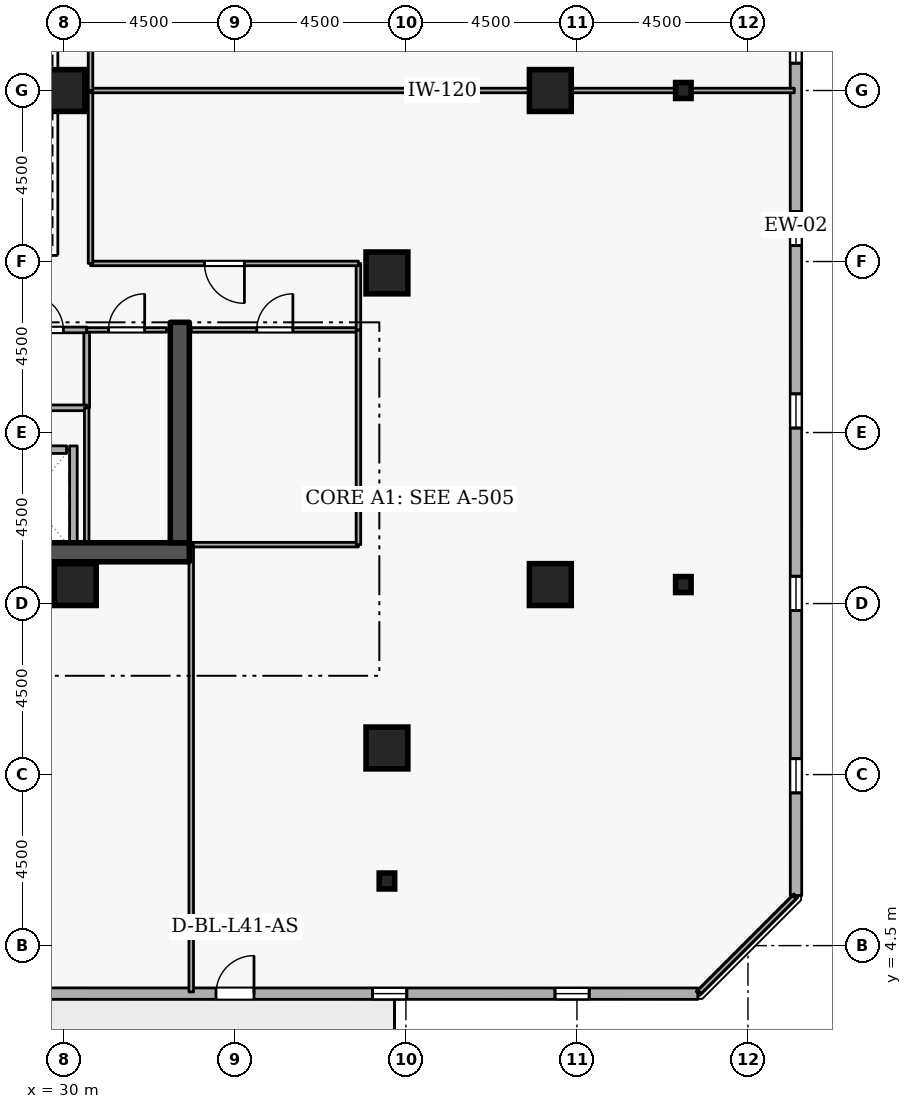
"""IFC4 building model, lengths in metres.
Left out: names, types, materials, properties, quantities, classifications, styles, units other than length and angle.
Written with IfcOpenShell. Run it as: python <this file> out.ifc"""

import sys

from ifc_helpers import new_model, si_unit, direction, frame, frame_2d, origin, origin_2d, place, context, subcontext, project, spatial, rectangle, i_section, extrude, element, fill, save


model = new_model("IFC4")
c1 = context("Model", 3, precision=1e-05, world=origin(), true_north=direction((0.0, 1.0)))
c2 = subcontext(c1, "Body", "Model", "MODEL_VIEW")
j1 = project(units=[si_unit("LENGTHUNIT", "METRE"), si_unit("PLANEANGLEUNIT", "RADIAN")], contexts=[c1])
p1 = place(None, origin())
s1 = spatial("IfcSite", under=j1, at=p1, CompositionType="ELEMENT")
p2 = place(p1, origin())
s2 = spatial("IfcBuilding", under=s1, at=p2, CompositionType="ELEMENT")
p3 = place(p2, frame((0.0, 0.0, 156.3)))
s3 = spatial("IfcBuildingStorey", under=s2, at=p3, CompositionType="ELEMENT", Elevation=156.3)
p4 = place(p3, frame((17.7, 14.85, 0.0), z_axis=(0.0, 0.0, 1.0), x_axis=(1.0, 0.0, 0.0)))
e1 = element("IfcWall", 1, at=p4, inside=s3, PredefinedType="SHEAR", context=c2, shape_type="SweptSolid", body=[
    extrude(rectangle(XDim=15.6, YDim=0.5, at=frame_2d((7.8, 0.0))), origin(), (0.0, 0.0, 1.0), 3.6),
])
p5 = place(p3, frame((33.05, 15.1, 0.0), z_axis=(0.0, 0.0, 1.0), x_axis=(0.0, 1.0, 0.0)))
e2 = element("IfcWall", 2, at=p5, inside=s3, PredefinedType="SHEAR", context=c2, shape_type="SweptSolid", body=[
    extrude(rectangle(XDim=5.8, YDim=0.5, at=frame_2d((2.9, 0.0))), origin(), (0.0, 0.0, 1.0), 3.6),
])
for number, where, z_axis, x_axis in (
    (3, (38.5, 9.7, 0.0), (0.0, 0.0, 1.0), (1.0, 0.0, 0.0)),
    (4, (42.8, 14.0, 0.0), (0.0, 0.0, 1.0), (1.0, 0.0, 0.0)),
    (5, (42.8, 27.0, 0.0), (0.0, 0.0, 1.0), (1.0, 0.0, 0.0)),
    (6, (38.5, 22.2, 0.0), (0.0, 0.0, 1.0), (1.0, 0.0, 0.0)),
    (7, (30.3, 14.0, 0.0), (0.0, 0.0, 1.0), (1.0, 0.0, 0.0)),
    (8, (30.0, 27.0, 0.0), (0.0, 0.0, 1.0), (1.0, 0.0, 0.0)),
):
    element("IfcColumn", number, at=place(p3, frame(where, z_axis=z_axis, x_axis=x_axis)), inside=s3, PredefinedType="COLUMN", context=c2, shape_type="SweptSolid", body=[
        extrude(rectangle(XDim=1.1, YDim=1.1, at=origin_2d()), origin(), (0.0, 0.0, 1.0), 3.6),
    ])
for number, where, z_axis, x_axis in (
    (9, (38.5, 6.2, 0.0), (0.0, 0.0, 1.0), (1.0, 0.0, 0.0)),
    (10, (46.3, 14.0, 0.0), (0.0, 0.0, 1.0), (1.0, 0.0, 0.0)),
    (11, (46.3, 27.0, 0.0), (0.0, 0.0, 1.0), (1.0, 0.0, 0.0)),
):
    element("IfcColumn", number, at=place(p3, frame(where, z_axis=z_axis, x_axis=x_axis)), inside=s3, PredefinedType="COLUMN", context=c2, shape_type="SweptSolid", body=[
        extrude(i_section(OverallWidth=0.407, OverallDepth=0.419, WebThickness=0.031, FlangeThickness=0.049, FilletRadius=0.015, at=origin_2d()), origin(), (0.0, 0.0, 1.0), 3.6),
    ])
p6 = place(p3, frame((11.422, 3.239, 0.0), z_axis=(0.0, 0.0, 1.0), x_axis=(0.999999994606, -0.000103863011, 0.0)))
e12 = element("IfcWall", 12, at=p6, inside=s3, PredefinedType="STANDARD", context=c2, shape_type="SweptSolid", body=[
    extrude(rectangle(XDim=35.259, YDim=0.3, at=frame_2d((17.629, 0.0))), origin(), (0.0, 0.0, 1.0), 2.7),
])
p7 = place(p6, frame((22.58, 0.0, 0.0)))
e13 = element("IfcOpeningElement", 13, at=p7, cuts=e12, PredefinedType="OPENING", context=c2, shape_type="SweptSolid", body=[
    extrude(rectangle(XDim=1.0, YDim=2.08, at=frame_2d((0.5, 1.04))), frame((0.0, 0.16, 0.0), z_axis=(0.0, -1.0, 0.0), x_axis=(1.0, 0.0, 0.0)), (0.0, 0.0, 1.0), 0.32),
])
p8 = place(p6, frame((7.5, 0.0, 0.72)))
e14 = element("IfcOpeningElement", 14, at=p8, cuts=e12, PredefinedType="OPENING", context=c2, shape_type="SweptSolid", body=[
    extrude(rectangle(XDim=0.9, YDim=1.75, at=frame_2d((0.45, 0.875))), frame((0.0, 0.16, 0.0), z_axis=(0.0, -1.0, 0.0), x_axis=(1.0, 0.0, 0.0)), (0.0, 0.0, 1.0), 0.32),
])
p9 = place(p6, frame((12.3, 0.0, 0.72)))
e15 = element("IfcOpeningElement", 15, at=p9, cuts=e12, PredefinedType="OPENING", context=c2, shape_type="SweptSolid", body=[
    extrude(rectangle(XDim=0.9, YDim=1.75, at=frame_2d((0.45, 0.875))), frame((0.0, 0.16, 0.0), z_axis=(0.0, -1.0, 0.0), x_axis=(1.0, 0.0, 0.0)), (0.0, 0.0, 1.0), 0.32),
])
p10 = place(p6, frame((17.1, 0.0, 0.72)))
e16 = element("IfcOpeningElement", 16, at=p10, cuts=e12, PredefinedType="OPENING", context=c2, shape_type="SweptSolid", body=[
    extrude(rectangle(XDim=0.9, YDim=1.75, at=frame_2d((0.45, 0.875))), frame((0.0, 0.16, 0.0), z_axis=(0.0, -1.0, 0.0), x_axis=(1.0, 0.0, 0.0)), (0.0, 0.0, 1.0), 0.32),
])
p11 = place(p6, frame((26.7, 0.0, 0.72)))
e17 = element("IfcOpeningElement", 17, at=p11, cuts=e12, PredefinedType="OPENING", context=c2, shape_type="SweptSolid", body=[
    extrude(rectangle(XDim=0.9, YDim=1.75, at=frame_2d((0.45, 0.875))), frame((0.0, 0.16, 0.0), z_axis=(0.0, -1.0, 0.0), x_axis=(1.0, 0.0, 0.0)), (0.0, 0.0, 1.0), 0.32),
])
p12 = place(p6, frame((31.5, 0.0, 0.72)))
e18 = element("IfcOpeningElement", 18, at=p12, cuts=e12, PredefinedType="OPENING", context=c2, shape_type="SweptSolid", body=[
    extrude(rectangle(XDim=0.9, YDim=1.75, at=frame_2d((0.45, 0.875))), frame((0.0, 0.16, 0.0), z_axis=(0.0, -1.0, 0.0), x_axis=(1.0, 0.0, 0.0)), (0.0, 0.0, 1.0), 0.32),
])
p13 = place(p3, frame((49.265, 5.819, 0.0), z_axis=(0.0, 0.0, 1.0), x_axis=(-0.000103863011, 0.999999994606, 0.0)))
e19 = element("IfcWall", 19, at=p13, inside=s3, PredefinedType="STANDARD", context=c2, shape_type="SweptSolid", body=[
    extrude(rectangle(XDim=35.259, YDim=0.3, at=frame_2d((17.629, 0.0))), origin(), (0.0, 0.0, 1.0), 2.7),
])
p14 = place(p13, frame((2.7, 0.0, 0.72)))
e20 = element("IfcOpeningElement", 20, at=p14, cuts=e19, PredefinedType="OPENING", context=c2, shape_type="SweptSolid", body=[
    extrude(rectangle(XDim=0.9, YDim=1.75, at=frame_2d((0.45, 0.875))), frame((0.0, 0.16, 0.0), z_axis=(0.0, -1.0, 0.0), x_axis=(1.0, 0.0, 0.0)), (0.0, 0.0, 1.0), 0.32),
])
p15 = place(p13, frame((7.5, 0.0, 0.72)))
e21 = element("IfcOpeningElement", 21, at=p15, cuts=e19, PredefinedType="OPENING", context=c2, shape_type="SweptSolid", body=[
    extrude(rectangle(XDim=0.9, YDim=1.75, at=frame_2d((0.45, 0.875))), frame((0.0, 0.16, 0.0), z_axis=(0.0, -1.0, 0.0), x_axis=(1.0, 0.0, 0.0)), (0.0, 0.0, 1.0), 0.32),
])
p16 = place(p13, frame((12.3, 0.0, 0.72)))
e22 = element("IfcOpeningElement", 22, at=p16, cuts=e19, PredefinedType="OPENING", context=c2, shape_type="SweptSolid", body=[
    extrude(rectangle(XDim=0.9, YDim=1.75, at=frame_2d((0.45, 0.875))), frame((0.0, 0.16, 0.0), z_axis=(0.0, -1.0, 0.0), x_axis=(1.0, 0.0, 0.0)), (0.0, 0.0, 1.0), 0.32),
])
p17 = place(p13, frame((17.1, 0.0, 0.72)))
e23 = element("IfcOpeningElement", 23, at=p17, cuts=e19, PredefinedType="OPENING", context=c2, shape_type="SweptSolid", body=[
    extrude(rectangle(XDim=0.9, YDim=1.75, at=frame_2d((0.45, 0.875))), frame((0.0, 0.16, 0.0), z_axis=(0.0, -1.0, 0.0), x_axis=(1.0, 0.0, 0.0)), (0.0, 0.0, 1.0), 0.32),
])
p18 = place(p13, frame((21.9, 0.0, 0.72)))
e24 = element("IfcOpeningElement", 24, at=p18, cuts=e19, PredefinedType="OPENING", context=c2, shape_type="SweptSolid", body=[
    extrude(rectangle(XDim=0.9, YDim=1.75, at=frame_2d((0.45, 0.875))), frame((0.0, 0.16, 0.0), z_axis=(0.0, -1.0, 0.0), x_axis=(1.0, 0.0, 0.0)), (0.0, 0.0, 1.0), 0.32),
])
p19 = place(p13, frame((26.7, 0.0, 0.72)))
e25 = element("IfcOpeningElement", 25, at=p19, cuts=e19, PredefinedType="OPENING", context=c2, shape_type="SweptSolid", body=[
    extrude(rectangle(XDim=0.9, YDim=1.75, at=frame_2d((0.45, 0.875))), frame((0.0, 0.16, 0.0), z_axis=(0.0, -1.0, 0.0), x_axis=(1.0, 0.0, 0.0)), (0.0, 0.0, 1.0), 0.32),
])
p20 = place(p13, frame((31.5, 0.0, 0.72)))
e26 = element("IfcOpeningElement", 26, at=p20, cuts=e19, PredefinedType="OPENING", context=c2, shape_type="SweptSolid", body=[
    extrude(rectangle(XDim=0.9, YDim=1.75, at=frame_2d((0.45, 0.875))), frame((0.0, 0.16, 0.0), z_axis=(0.0, -1.0, 0.0), x_axis=(1.0, 0.0, 0.0)), (0.0, 0.0, 1.0), 0.32),
])
p21 = place(p3, frame((28.08, 17.55, 0.0), z_axis=(0.0, 0.0, 1.0), x_axis=(1.0, 0.0, 0.0)))
e27 = element("IfcWall", 27, at=p21, inside=s3, PredefinedType="STANDARD", context=c2, shape_type="SweptSolid", body=[
    extrude(rectangle(XDim=1.99, YDim=0.2, at=frame_2d((0.995, 0.0))), origin(), (0.0, 0.0, 1.0), 3.34),
])
p22 = place(p3, frame((30.25, 15.112, 0.0), z_axis=(0.0, 0.0, 1.0), x_axis=(0.0, 1.0, 0.0)))
e28 = element("IfcWall", 28, at=p22, inside=s3, PredefinedType="STANDARD", context=c2, shape_type="SweptSolid", body=[
    extrude(rectangle(XDim=2.536, YDim=0.2, at=frame_2d((1.268, 0.0))), origin(), (0.0, 0.0, 1.0), 3.34),
])
p23 = place(p3, frame((30.6, 20.7, 0.0), z_axis=(0.0, 0.0, 1.0), x_axis=(0.0, -1.0, 0.0)))
e29 = element("IfcWall", 29, at=p23, inside=s3, PredefinedType="PARTITIONING", context=c2, shape_type="SweptSolid", body=[
    extrude(rectangle(XDim=2.05, YDim=0.15, at=frame_2d((1.025, 0.0))), origin(), (0.0, 0.0, 1.0), 3.34),
])
p24 = place(p3, frame((30.6, 18.65, 0.0), z_axis=(0.0, 0.0, 1.0), x_axis=(-1.0, 0.0, 0.0)))
e30 = element("IfcWall", 30, at=p24, inside=s3, PredefinedType="PARTITIONING", context=c2, shape_type="SweptSolid", body=[
    extrude(rectangle(XDim=2.15, YDim=0.15, at=frame_2d((1.075, 0.0))), origin(), (0.0, 0.0, 1.0), 3.34),
])
p25 = place(p3, frame((28.45, 20.7, 0.0), z_axis=(0.0, 0.0, 1.0), x_axis=(1.0, 0.0, 0.0)))
e31 = element("IfcWall", 31, at=p25, inside=s3, PredefinedType="PARTITIONING", context=c2, shape_type="SweptSolid", body=[
    extrude(rectangle(XDim=2.15, YDim=0.15, at=frame_2d((1.075, 0.0))), origin(), (0.0, 0.0, 1.0), 3.34),
])
p26 = place(p25, frame((0.615, 0.0, 0.0)))
e32 = element("IfcOpeningElement", 32, at=p26, cuts=e31, PredefinedType="OPENING", context=c2, shape_type="SweptSolid", body=[
    extrude(rectangle(XDim=0.92, YDim=2.08, at=frame_2d((0.46, 1.04))), frame((0.0, 0.085, 0.0), z_axis=(0.0, -1.0, 0.0), x_axis=(1.0, 0.0, 0.0)), (0.0, 0.0, 1.0), 0.17),
])
p27 = place(p3, frame((30.6, 15.1, 0.0), z_axis=(0.0, 0.0, 1.0), x_axis=(0.0, 1.0, 0.0)))
e33 = element("IfcWall", 33, at=p27, inside=s3, PredefinedType="PARTITIONING", context=c2, shape_type="SweptSolid", body=[
    extrude(rectangle(XDim=3.55, YDim=0.12, at=frame_2d((1.775, 0.0))), origin(), (0.0, 0.0, 1.0), 3.34),
])
p28 = place(p3, frame((30.6, 20.7, 0.0), z_axis=(0.0, 0.0, 1.0), x_axis=(1.0, 0.0, 0.0)))
e34 = element("IfcWall", 34, at=p28, inside=s3, PredefinedType="PARTITIONING", context=c2, shape_type="SweptSolid", body=[
    extrude(rectangle(XDim=2.1, YDim=0.12, at=frame_2d((1.05, 0.0))), origin(), (0.0, 0.0, 1.0), 3.34),
])
p29 = place(p28, frame((0.575, 0.0, 0.0)))
e35 = element("IfcOpeningElement", 35, at=p29, cuts=e34, PredefinedType="OPENING", context=c2, shape_type="SweptSolid", body=[
    extrude(rectangle(XDim=0.95, YDim=2.1, at=frame_2d((0.475, 1.05))), frame((0.0, 0.07, 0.0), z_axis=(0.0, -1.0, 0.0), x_axis=(1.0, 0.0, 0.0)), (0.0, 0.0, 1.0), 0.14),
])
p30 = place(p3, frame((37.75, 15.05, 0.0), z_axis=(0.0, 0.0, 1.0), x_axis=(-1.0, 0.0, 0.0)))
e36 = element("IfcWall", 36, at=p30, inside=s3, PredefinedType="PARTITIONING", context=c2, shape_type="SweptSolid", body=[
    extrude(rectangle(XDim=4.4, YDim=0.12, at=frame_2d((2.2, 0.0))), origin(), (0.0, 0.0, 1.0), 3.34),
])
p31 = place(p3, frame((33.35, 20.7, 0.0), z_axis=(0.0, 0.0, 1.0), x_axis=(1.0, 0.0, 0.0)))
e37 = element("IfcWall", 37, at=p31, inside=s3, PredefinedType="PARTITIONING", context=c2, shape_type="SweptSolid", body=[
    extrude(rectangle(XDim=4.4, YDim=0.12, at=frame_2d((2.2, 0.0))), origin(), (0.0, 0.0, 1.0), 3.34),
])
p32 = place(p31, frame((1.725, 0.0, 0.0)))
e38 = element("IfcOpeningElement", 38, at=p32, cuts=e37, PredefinedType="OPENING", context=c2, shape_type="SweptSolid", body=[
    extrude(rectangle(XDim=0.95, YDim=2.1, at=frame_2d((0.475, 1.05))), frame((0.0, 0.07, 0.0), z_axis=(0.0, -1.0, 0.0), x_axis=(1.0, 0.0, 0.0)), (0.0, 0.0, 1.0), 0.14),
])
p33 = place(p3, frame((37.75, 20.7, 0.0), z_axis=(0.0, 0.0, 1.0), x_axis=(0.0, -1.0, 0.0)))
e39 = element("IfcWall", 39, at=p33, inside=s3, PredefinedType="PARTITIONING", context=c2, shape_type="SweptSolid", body=[
    extrude(rectangle(XDim=5.65, YDim=0.12, at=frame_2d((2.825, 0.0))), origin(), (0.0, 0.0, 1.0), 3.34),
])
p34 = place(p3, frame((33.35, 3.28, 0.0), z_axis=(0.0, 0.0, 1.0), x_axis=(0.0, 1.0, 0.0)))
e40 = element("IfcWall", 40, at=p34, inside=s3, PredefinedType="PARTITIONING", context=c2, shape_type="SweptSolid", body=[
    extrude(rectangle(XDim=11.77, YDim=0.12, at=frame_2d((5.885, 0.0))), origin(), (0.0, 0.0, 1.0), 2.545),
])
p35 = place(p3, frame((37.75, 20.7, 0.0), z_axis=(0.0, 0.0, 1.0), x_axis=(0.0, 1.0, 0.0)))
e41 = element("IfcWall", 41, at=p35, inside=s3, PredefinedType="PARTITIONING", context=c2, shape_type="SweptSolid", body=[
    extrude(rectangle(XDim=1.75, YDim=0.12, at=frame_2d((0.875, 0.0))), origin(), (0.0, 0.0, 1.0), 3.34),
])
p36 = place(p3, frame((37.75, 22.45, 0.0), z_axis=(0.0, 0.0, 1.0), x_axis=(-1.0, 0.0, 0.0)))
e42 = element("IfcWall", 42, at=p36, inside=s3, PredefinedType="PARTITIONING", context=c2, shape_type="SweptSolid", body=[
    extrude(rectangle(XDim=7.05, YDim=0.12, at=frame_2d((3.525, 0.0))), origin(), (0.0, 0.0, 1.0), 3.34),
])
p37 = place(p36, frame((3.0, 0.0, 0.0)))
e43 = element("IfcOpeningElement", 43, at=p37, cuts=e42, PredefinedType="OPENING", context=c2, shape_type="SweptSolid", body=[
    extrude(rectangle(XDim=1.05, YDim=2.1, at=frame_2d((0.525, 1.05))), frame((0.0, 0.07, 0.0), z_axis=(0.0, -1.0, 0.0), x_axis=(1.0, 0.0, 0.0)), (0.0, 0.0, 1.0), 0.14),
])
p38 = place(p3, frame((30.7, 22.45, 0.0), z_axis=(0.0, 0.0, 1.0), x_axis=(0.0, 1.0, 0.0)))
e44 = element("IfcWall", 44, at=p38, inside=s3, PredefinedType="PARTITIONING", context=c2, shape_type="SweptSolid", body=[
    extrude(rectangle(XDim=4.55, YDim=0.12, at=frame_2d((2.275, 0.0))), origin(), (0.0, 0.0, 1.0), 3.34),
])
p39 = place(p3, frame((30.7, 27.0, 0.0), z_axis=(0.0, 0.0, 1.0), x_axis=(1.0, 0.0, 0.0)))
e45 = element("IfcWall", 45, at=p39, inside=s3, PredefinedType="PARTITIONING", context=c2, shape_type="SweptSolid", body=[
    extrude(rectangle(XDim=18.52, YDim=0.12, at=frame_2d((9.26, 0.0))), origin(), (0.0, 0.0, 1.0), 2.932),
])
p40 = place(p3, frame((49.22, 5.775, 0.0), z_axis=(0.0, 0.0, 1.0), x_axis=(-0.707106781187, -0.707106781187, 0.0)))
e46 = element("IfcWall", 46, at=p40, inside=s3, PredefinedType="PARTITIONING", context=c2, shape_type="SweptSolid", body=[
    extrude(rectangle(XDim=3.528, YDim=0.12, at=frame_2d((1.764, 0.0))), origin(), (0.0, 0.0, 1.0), 3.34),
])
p41 = place(p3, frame((30.7, 27.0, 0.0), z_axis=(0.0, 0.0, 1.0), x_axis=(0.0, 1.0, 0.0)))
e47 = element("IfcWall", 47, at=p41, inside=s3, PredefinedType="PARTITIONING", context=c2, shape_type="SweptSolid", body=[
    extrude(rectangle(XDim=4.55, YDim=0.12, at=frame_2d((2.275, 0.0))), origin(), (0.0, 0.0, 1.0), 3.34),
])
p42 = place(p7, origin())
e48 = element("IfcDoor", 48, at=p42, inside=s3, OperationType="SINGLE_SWING_RIGHT", PredefinedType="DOOR", context=c2, shape_type="SweptSolid", body=[
    extrude(rectangle(XDim=1.0, YDim=2.08, at=frame_2d((0.5, 1.04))), frame((0.0, 0.025, 0.0), z_axis=(0.0, -1.0, 0.0), x_axis=(1.0, 0.0, 0.0)), (0.0, 0.0, 1.0), 0.05),
])
fill(e13, e48)
p43 = place(p11, origin())
e49 = element("IfcWindow", 49, at=p43, inside=s3, PartitioningType="SINGLE_PANEL", PredefinedType="WINDOW", context=c2, shape_type="SweptSolid", body=[
    extrude(rectangle(XDim=0.9, YDim=1.75, at=frame_2d((0.45, 0.875))), frame((0.0, 0.03, 0.0), z_axis=(0.0, -1.0, 0.0), x_axis=(1.0, 0.0, 0.0)), (0.0, 0.0, 1.0), 0.06),
])
fill(e17, e49)
p44 = place(p12, origin())
e50 = element("IfcWindow", 50, at=p44, inside=s3, PartitioningType="SINGLE_PANEL", PredefinedType="WINDOW", context=c2, shape_type="SweptSolid", body=[
    extrude(rectangle(XDim=0.9, YDim=1.75, at=frame_2d((0.45, 0.875))), frame((0.0, 0.03, 0.0), z_axis=(0.0, -1.0, 0.0), x_axis=(1.0, 0.0, 0.0)), (0.0, 0.0, 1.0), 0.06),
])
fill(e18, e50)
p45 = place(p14, origin())
e51 = element("IfcWindow", 51, at=p45, inside=s3, PartitioningType="SINGLE_PANEL", PredefinedType="WINDOW", context=c2, shape_type="SweptSolid", body=[
    extrude(rectangle(XDim=0.9, YDim=1.75, at=frame_2d((0.45, 0.875))), frame((0.0, 0.03, 0.0), z_axis=(0.0, -1.0, 0.0), x_axis=(1.0, 0.0, 0.0)), (0.0, 0.0, 1.0), 0.06),
])
fill(e20, e51)
p46 = place(p15, origin())
e52 = element("IfcWindow", 52, at=p46, inside=s3, PartitioningType="SINGLE_PANEL", PredefinedType="WINDOW", context=c2, shape_type="SweptSolid", body=[
    extrude(rectangle(XDim=0.9, YDim=1.75, at=frame_2d((0.45, 0.875))), frame((0.0, 0.03, 0.0), z_axis=(0.0, -1.0, 0.0), x_axis=(1.0, 0.0, 0.0)), (0.0, 0.0, 1.0), 0.06),
])
fill(e21, e52)
p47 = place(p16, origin())
e53 = element("IfcWindow", 53, at=p47, inside=s3, PartitioningType="SINGLE_PANEL", PredefinedType="WINDOW", context=c2, shape_type="SweptSolid", body=[
    extrude(rectangle(XDim=0.9, YDim=1.75, at=frame_2d((0.45, 0.875))), frame((0.0, 0.03, 0.0), z_axis=(0.0, -1.0, 0.0), x_axis=(1.0, 0.0, 0.0)), (0.0, 0.0, 1.0), 0.06),
])
fill(e22, e53)
p48 = place(p17, origin())
e54 = element("IfcWindow", 54, at=p48, inside=s3, PartitioningType="SINGLE_PANEL", PredefinedType="WINDOW", context=c2, shape_type="SweptSolid", body=[
    extrude(rectangle(XDim=0.9, YDim=1.75, at=frame_2d((0.45, 0.875))), frame((0.0, 0.03, 0.0), z_axis=(0.0, -1.0, 0.0), x_axis=(1.0, 0.0, 0.0)), (0.0, 0.0, 1.0), 0.06),
])
fill(e23, e54)
p49 = place(p18, origin())
e55 = element("IfcWindow", 55, at=p49, inside=s3, PartitioningType="SINGLE_PANEL", PredefinedType="WINDOW", context=c2, shape_type="SweptSolid", body=[
    extrude(rectangle(XDim=0.9, YDim=1.75, at=frame_2d((0.45, 0.875))), frame((0.0, 0.03, 0.0), z_axis=(0.0, -1.0, 0.0), x_axis=(1.0, 0.0, 0.0)), (0.0, 0.0, 1.0), 0.06),
])
fill(e24, e55)
p50 = place(p26, origin())
e56 = element("IfcDoor", 56, at=p50, inside=s3, OperationType="SINGLE_SWING_LEFT", PredefinedType="DOOR", context=c2, shape_type="SweptSolid", body=[
    extrude(rectangle(XDim=0.92, YDim=2.08, at=frame_2d((0.46, 1.04))), frame((0.0, 0.025, 0.0), z_axis=(0.0, -1.0, 0.0), x_axis=(1.0, 0.0, 0.0)), (0.0, 0.0, 1.0), 0.05),
])
fill(e32, e56)
p51 = place(p29, origin())
e57 = element("IfcDoor", 57, at=p51, inside=s3, OperationType="SINGLE_SWING_RIGHT", PredefinedType="DOOR", context=c2, shape_type="SweptSolid", body=[
    extrude(rectangle(XDim=0.95, YDim=2.1, at=frame_2d((0.475, 1.05))), frame((0.0, 0.025, 0.0), z_axis=(0.0, -1.0, 0.0), x_axis=(1.0, 0.0, 0.0)), (0.0, 0.0, 1.0), 0.05),
])
fill(e35, e57)
p52 = place(p32, origin())
e58 = element("IfcDoor", 58, at=p52, inside=s3, OperationType="SINGLE_SWING_RIGHT", PredefinedType="DOOR", context=c2, shape_type="SweptSolid", body=[
    extrude(rectangle(XDim=0.95, YDim=2.1, at=frame_2d((0.475, 1.05))), frame((0.0, 0.025, 0.0), z_axis=(0.0, -1.0, 0.0), x_axis=(1.0, 0.0, 0.0)), (0.0, 0.0, 1.0), 0.05),
])
fill(e38, e58)
p53 = place(p37, origin())
e59 = element("IfcDoor", 59, at=p53, inside=s3, OperationType="SINGLE_SWING_LEFT", PredefinedType="DOOR", context=c2, shape_type="SweptSolid", body=[
    extrude(rectangle(XDim=1.05, YDim=2.1, at=frame_2d((0.525, 1.05))), frame((0.0, 0.025, 0.0), z_axis=(0.0, -1.0, 0.0), x_axis=(1.0, 0.0, 0.0)), (0.0, 0.0, 1.0), 0.05),
])
fill(e43, e59)
save(model, sys.argv[1])
